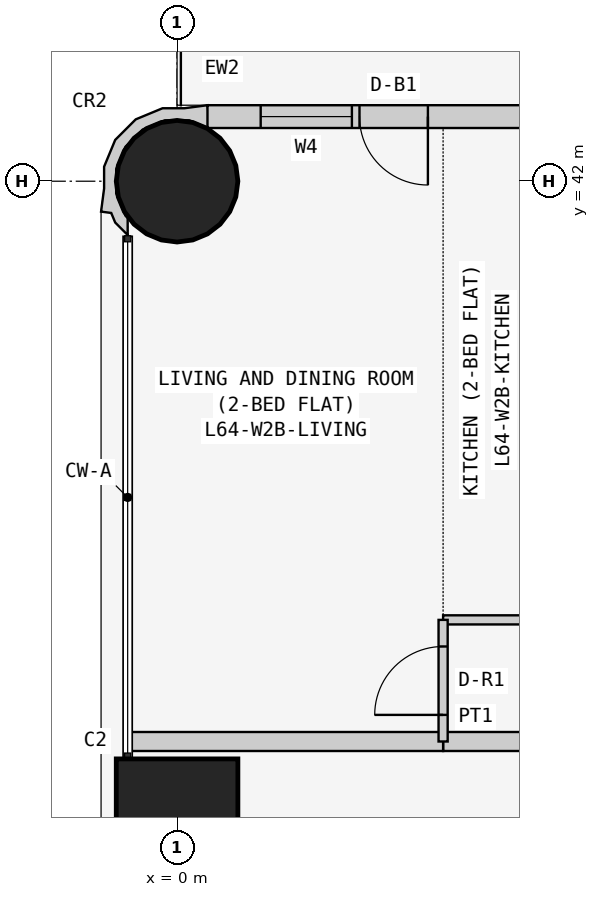
"""IFC4 building model, lengths in metres.
Left out: names, types, materials, properties, quantities, classifications, styles, units other than length and angle.
Written with IfcOpenShell. Run it as: python <this file> out.ifc"""

import sys

from ifc_helpers import new_model, si_unit, direction, frame, frame_2d, origin, origin_2d, place, context, subcontext, project, spatial, polyline, rectangle, circle, outline, extrude, element, fill, save


model = new_model("IFC4")
c1 = context("Model", 3, precision=1e-05, world=origin(), true_north=direction((0.0, 1.0)))
c2 = subcontext(c1, "Body", "Model", "MODEL_VIEW")
j1 = project(units=[si_unit("LENGTHUNIT", "METRE"), si_unit("PLANEANGLEUNIT", "RADIAN")], contexts=[c1])
p1 = place(None, origin())
s1 = spatial("IfcSite", under=j1, at=p1, CompositionType="ELEMENT")
p2 = place(p1, origin())
s2 = spatial("IfcBuilding", under=s1, at=p2, CompositionType="ELEMENT")
p3 = place(p2, frame((0.0, 0.0, 244.5)))
s3 = spatial("IfcBuildingStorey", under=s2, at=p3, CompositionType="ELEMENT", Elevation=244.5)
p4 = place(p3, frame((0.0, 33.6, 0.0), z_axis=(0.0, 0.0, 1.0), x_axis=(1.0, 0.0, 0.0)))
e1 = element("IfcColumn", 1, at=p4, inside=s3, PredefinedType="COLUMN", context=c2, shape_type="SweptSolid", body=[
    extrude(rectangle(XDim=1.6, YDim=1.6, at=origin_2d()), origin(), (0.0, 0.0, 1.0), 3.6),
])
p5 = place(p3, frame((0.0, 42.0, 0.0), z_axis=(0.0, 0.0, 1.0), x_axis=(1.0, 0.0, 0.0)))
e2 = element("IfcColumn", 2, at=p5, inside=s3, PredefinedType="COLUMN", context=c2, shape_type="SweptSolid", body=[
    extrude(circle(Radius=0.8, at=origin_2d()), origin(), (0.0, 0.0, 1.0), 3.6),
])
p6 = place(p3, frame((15.8, 42.85, 0.0), z_axis=(0.0, 0.0, 1.0), x_axis=(-1.0, 0.0, 0.0)))
e3 = element("IfcWall", 3, at=p6, inside=s3, PredefinedType="SOLIDWALL", context=c2, shape_type="SweptSolid", body=[
    extrude(rectangle(XDim=15.4, YDim=0.3, at=frame_2d((7.7, 0.0))), origin(), (0.0, 0.0, 1.0), 3.35),
])
p7 = place(p6, frame((1.2, 0.0, 0.9)))
e4 = element("IfcOpeningElement", 4, at=p7, cuts=e3, PredefinedType="OPENING", context=c2, shape_type="SweptSolid", body=[
    extrude(rectangle(XDim=1.8, YDim=1.5, at=frame_2d((0.9, 0.75))), frame((0.0, 0.16, 0.0), z_axis=(0.0, -1.0, 0.0), x_axis=(1.0, 0.0, 0.0)), (0.0, 0.0, 1.0), 0.32),
])
p8 = place(p6, frame((4.95, 0.0, 1.5)))
e5 = element("IfcOpeningElement", 5, at=p8, cuts=e3, PredefinedType="OPENING", context=c2, shape_type="SweptSolid", body=[
    extrude(rectangle(XDim=0.9, YDim=0.7, at=frame_2d((0.45, 0.35))), frame((0.0, 0.16, 0.0), z_axis=(0.0, -1.0, 0.0), x_axis=(1.0, 0.0, 0.0)), (0.0, 0.0, 1.0), 0.32),
])
p9 = place(p6, frame((8.5, 0.0, 0.9)))
e6 = element("IfcOpeningElement", 6, at=p9, cuts=e3, PredefinedType="OPENING", context=c2, shape_type="SweptSolid", body=[
    extrude(rectangle(XDim=1.8, YDim=1.5, at=frame_2d((0.9, 0.75))), frame((0.0, 0.16, 0.0), z_axis=(0.0, -1.0, 0.0), x_axis=(1.0, 0.0, 0.0)), (0.0, 0.0, 1.0), 0.32),
])
p10 = place(p6, frame((12.5, 0.0, 0.0)))
e7 = element("IfcOpeningElement", 7, at=p10, cuts=e3, PredefinedType="OPENING", context=c2, shape_type="SweptSolid", body=[
    extrude(rectangle(XDim=0.9, YDim=2.4, at=frame_2d((0.45, 1.2))), frame((0.0, 0.16, 0.0), z_axis=(0.0, -1.0, 0.0), x_axis=(1.0, 0.0, 0.0)), (0.0, 0.0, 1.0), 0.32),
])
p11 = place(p6, frame((13.5, 0.0, 0.9)))
e8 = element("IfcOpeningElement", 8, at=p11, cuts=e3, PredefinedType="OPENING", context=c2, shape_type="SweptSolid", body=[
    extrude(rectangle(XDim=1.2, YDim=1.5, at=frame_2d((0.6, 0.75))), frame((0.0, 0.16, 0.0), z_axis=(0.0, -1.0, 0.0), x_axis=(1.0, 0.0, 0.0)), (0.0, 0.0, 1.0), 0.32),
])
p12 = place(p3, frame((0.327, 42.817, 0.0), z_axis=(0.0, 0.0, 1.0), x_axis=(-0.93923434088, 0.343276641956, 0.0)))
e9 = element("IfcWall", 9, at=p12, inside=s3, PredefinedType="SOLIDWALL", context=c2, shape_type="SweptSolid", body=[
    extrude(outline(polyline([(-0.006, -0.197), (0.266, -0.055), (0.535, 0.044), (0.816, 0.302), (0.977, 0.648), (0.994, 1.03), (0.895, 1.299), (0.828, 1.598), (0.697, 1.569), (0.604, 1.67), (0.394, 1.767), (0.471, 1.556), (0.509, 1.539), (0.724, 1.304), (0.833, 1.005), (0.82, 0.687), (0.686, 0.397), (0.451, 0.182), (0.152, 0.073), (-0.116, 0.084), (-0.127, 0.078), (-0.146, 0.071), (-0.006, -0.197)])), origin(), (0.0, 0.0, 1.0), 3.35),
])
p13 = place(p3, frame((3.5, 34.629, 0.0), z_axis=(0.0, 0.0, 1.0), x_axis=(1.0, 0.0, 0.0)))
e10 = element("IfcWall", 10, at=p13, inside=s3, PredefinedType="PARTITIONING", context=c2, shape_type="SweptSolid", body=[
    extrude(rectangle(XDim=6.3, YDim=0.25, at=frame_2d((3.15, 0.0))), origin(), (0.0, 0.0, 1.0), 3.35),
])
p14 = place(p3, frame((-0.65, 34.629, 0.0), z_axis=(0.0, 0.0, 1.0), x_axis=(1.0, 0.0, 0.0)))
e11 = element("IfcWall", 11, at=p14, inside=s3, PredefinedType="PARTITIONING", context=c2, shape_type="SweptSolid", body=[
    extrude(rectangle(XDim=4.15, YDim=0.25, at=frame_2d((2.075, 0.0))), origin(), (0.0, 0.0, 1.0), 3.35),
])
p15 = place(p3, frame((3.5, 36.229, 0.0), z_axis=(0.0, 0.0, 1.0), x_axis=(1.0, 0.0, 0.0)))
e12 = element("IfcWall", 12, at=p15, inside=s3, PredefinedType="PARTITIONING", context=c2, shape_type="SweptSolid", body=[
    extrude(rectangle(XDim=1.2, YDim=0.12, at=frame_2d((0.6, 0.0))), origin(), (0.0, 0.0, 1.0), 3.35),
])
p16 = place(p3, frame((3.5, 34.629, 0.0), z_axis=(0.0, 0.0, 1.0), x_axis=(0.0, 1.0, 0.0)))
e13 = element("IfcWall", 13, at=p16, inside=s3, PredefinedType="PARTITIONING", context=c2, shape_type="SweptSolid", body=[
    extrude(rectangle(XDim=1.6, YDim=0.12, at=frame_2d((0.8, 0.0))), origin(), (0.0, 0.0, 1.0), 3.35),
])
p17 = place(p16, frame((0.35, 0.0, 0.0)))
e14 = element("IfcOpeningElement", 14, at=p17, cuts=e13, PredefinedType="OPENING", context=c2, shape_type="SweptSolid", body=[
    extrude(rectangle(XDim=0.9, YDim=2.1, at=frame_2d((0.45, 1.05))), frame((0.0, 0.07, 0.0), z_axis=(0.0, -1.0, 0.0), x_axis=(1.0, 0.0, 0.0)), (0.0, 0.0, 1.0), 0.14),
])
p18 = place(p10, origin())
e15 = element("IfcDoor", 15, at=p18, inside=s3, OperationType="SINGLE_SWING_LEFT", PredefinedType="DOOR", context=c2, shape_type="SweptSolid", body=[
    extrude(rectangle(XDim=0.9, YDim=2.4, at=frame_2d((0.45, 1.2))), frame((0.0, 0.025, 0.0), z_axis=(0.0, -1.0, 0.0), x_axis=(1.0, 0.0, 0.0)), (0.0, 0.0, 1.0), 0.05),
])
fill(e7, e15)
p19 = place(p11, origin())
e16 = element("IfcWindow", 16, at=p19, inside=s3, PartitioningType="SINGLE_PANEL", PredefinedType="WINDOW", context=c2, shape_type="SweptSolid", body=[
    extrude(rectangle(XDim=1.2, YDim=1.5, at=frame_2d((0.6, 0.75))), frame((0.0, 0.03, 0.0), z_axis=(0.0, -1.0, 0.0), x_axis=(1.0, 0.0, 0.0)), (0.0, 0.0, 1.0), 0.06),
])
fill(e8, e16)
p20 = place(p17, origin())
e17 = element("IfcDoor", 17, at=p20, inside=s3, OperationType="SINGLE_SWING_LEFT", PredefinedType="DOOR", context=c2, shape_type="SweptSolid", body=[
    extrude(rectangle(XDim=0.9, YDim=2.1, at=frame_2d((0.45, 1.05))), frame((0.0, 0.025, 0.0), z_axis=(0.0, -1.0, 0.0), x_axis=(1.0, 0.0, 0.0)), (0.0, 0.0, 1.0), 0.05),
])
fill(e14, e17)
save(model, sys.argv[1])
